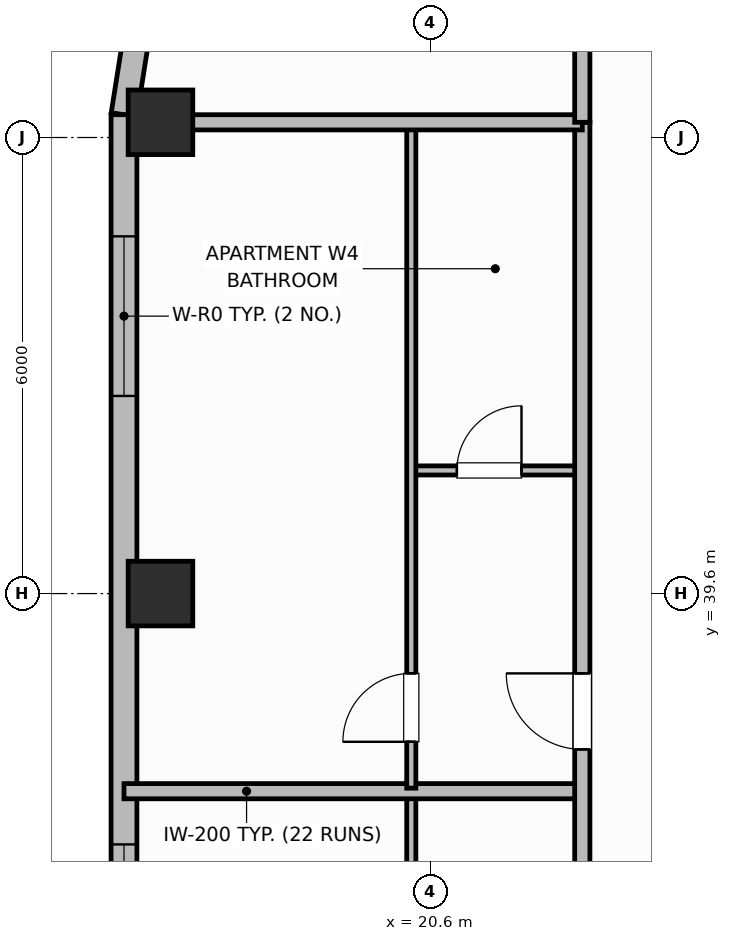
"""IFC4 building model, lengths in metres.
Left out: names, types, materials, properties, quantities, classifications, styles, units other than length and angle.
Written with IfcOpenShell. Run it as: python <this file> out.ifc"""

import sys

from ifc_helpers import new_model, si_unit, direction, frame, frame_2d, origin, origin_2d, place, context, subcontext, project, spatial, rectangle, extrude, element, fill, save


model = new_model("IFC4")
c1 = context("Model", 3, precision=1e-05, world=origin(), true_north=direction((0.0, 1.0)))
c2 = subcontext(c1, "Body", "Model", "MODEL_VIEW")
j1 = project(units=[si_unit("LENGTHUNIT", "METRE"), si_unit("PLANEANGLEUNIT", "RADIAN")], contexts=[c1])
p1 = place(None, origin())
s1 = spatial("IfcSite", under=j1, at=p1, CompositionType="ELEMENT")
p2 = place(p1, origin())
s2 = spatial("IfcBuilding", under=s1, at=p2, CompositionType="ELEMENT")
p3 = place(p2, frame((0.0, 0.0, 222.1)))
s3 = spatial("IfcBuildingStorey", under=s2, at=p3, CompositionType="ELEMENT", Elevation=222.1)
for number, where, z_axis, x_axis in (
    (1, (17.05, 39.6, 0.0), (0.0, 0.0, 1.0), (1.0, 0.0, 0.0)),
    (2, (17.05, 45.8, 0.0), (0.0, 0.0, 1.0), (1.0, 0.0, 0.0)),
):
    element("IfcColumn", number, at=place(p3, frame(where, z_axis=z_axis, x_axis=x_axis)), inside=s3, PredefinedType="COLUMN", context=c2, shape_type="SweptSolid", body=[
        extrude(rectangle(XDim=0.85, YDim=0.85, at=origin_2d()), origin(), (0.0, 0.0, 1.0), 3.7),
    ])
p4 = place(p3, frame((16.748, 47.022, 0.0), z_axis=(0.0, 0.0, 1.0), x_axis=(-0.156481329164, -0.987680916907, 0.0)))
e3 = element("IfcWall", 3, at=p4, inside=s3, PredefinedType="SOLIDWALL", context=c2, shape_type="SweptSolid", body=[
    extrude(rectangle(XDim=1.136, YDim=0.34, at=frame_2d((0.568, 0.0))), origin(), (0.0, 0.0, 1.0), 2.26),
])
p5 = place(p3, frame((16.57, 45.9, 0.0), z_axis=(0.0, 0.0, 1.0), x_axis=(0.0, -1.0, 0.0)))
e4 = element("IfcWall", 4, at=p5, inside=s3, PredefinedType="SOLIDWALL", context=c2, shape_type="SweptSolid", body=[
    extrude(rectangle(XDim=13.3, YDim=0.34, at=frame_2d((6.65, 0.0))), origin(), (0.0, 0.0, 1.0), 2.26),
])
p6 = place(p5, frame((1.6, 0.0, 0.3)))
e5 = element("IfcOpeningElement", 5, at=p6, cuts=e4, PredefinedType="OPENING", context=c2, shape_type="SweptSolid", body=[
    extrude(rectangle(XDim=2.1, YDim=1.9, at=frame_2d((1.05, 0.95))), frame((0.0, 0.18, 0.0), z_axis=(0.0, -1.0, 0.0), x_axis=(1.0, 0.0, 0.0)), (0.0, 0.0, 1.0), 0.36),
])
p7 = place(p5, frame((9.6, 0.0, 0.3)))
e6 = element("IfcOpeningElement", 6, at=p7, cuts=e4, PredefinedType="OPENING", context=c2, shape_type="SweptSolid", body=[
    extrude(rectangle(XDim=2.1, YDim=1.9, at=frame_2d((1.05, 0.95))), frame((0.0, 0.18, 0.0), z_axis=(0.0, -1.0, 0.0), x_axis=(1.0, 0.0, 0.0)), (0.0, 0.0, 1.0), 0.36),
])
p8 = place(p3, frame((20.35, 26.64, 0.0), z_axis=(0.0, 0.0, 1.0), x_axis=(0.0, 1.0, 0.0)))
e7 = element("IfcWall", 7, at=p8, inside=s3, PredefinedType="PARTITIONING", context=c2, shape_type="SweptSolid", body=[
    extrude(rectangle(XDim=10.32, YDim=0.12, at=frame_2d((5.16, 0.0))), origin(), (0.0, 0.0, 1.0), 2.24),
])
p9 = place(p8, frame((2.81, 0.0, 0.0)))
e8 = element("IfcOpeningElement", 8, at=p9, cuts=e7, PredefinedType="OPENING", context=c2, shape_type="SweptSolid", body=[
    extrude(rectangle(XDim=0.9, YDim=2.1, at=frame_2d((0.45, 1.05))), frame((0.0, 0.07, 0.0), z_axis=(0.0, -1.0, 0.0), x_axis=(1.0, 0.0, 0.0)), (0.0, 0.0, 1.0), 0.14),
])
p10 = place(p3, frame((16.57, 37.0, 0.0), z_axis=(0.0, 0.0, 1.0), x_axis=(1.0, 0.0, 0.0)))
e9 = element("IfcWall", 9, at=p10, inside=s3, PredefinedType="PARTITIONING", context=c2, shape_type="SweptSolid", body=[
    extrude(rectangle(XDim=6.03, YDim=0.2, at=frame_2d((3.015, 0.0))), origin(), (0.0, 0.0, 1.0), 2.24),
])
p11 = place(p3, frame((20.35, 41.22, 0.0), z_axis=(0.0, 0.0, 1.0), x_axis=(1.0, 0.0, 0.0)))
e10 = element("IfcWall", 10, at=p11, inside=s3, PredefinedType="PARTITIONING", context=c2, shape_type="SweptSolid", body=[
    extrude(rectangle(XDim=2.25, YDim=0.12, at=frame_2d((1.125, 0.0))), origin(), (0.0, 0.0, 1.0), 2.24),
])
p12 = place(p11, frame((0.6, 0.0, 0.0)))
e11 = element("IfcOpeningElement", 11, at=p12, cuts=e10, PredefinedType="OPENING", context=c2, shape_type="SweptSolid", body=[
    extrude(rectangle(XDim=0.85, YDim=2.1, at=frame_2d((0.425, 1.05))), frame((0.0, 0.07, 0.0), z_axis=(0.0, -1.0, 0.0), x_axis=(1.0, 0.0, 0.0)), (0.0, 0.0, 1.0), 0.14),
])
p13 = place(p3, frame((20.35, 37.04, 0.0), z_axis=(0.0, 0.0, 1.0), x_axis=(0.0, 1.0, 0.0)))
e12 = element("IfcWall", 12, at=p13, inside=s3, PredefinedType="PARTITIONING", context=c2, shape_type="SweptSolid", body=[
    extrude(rectangle(XDim=8.72, YDim=0.12, at=frame_2d((4.36, 0.0))), origin(), (0.0, 0.0, 1.0), 2.24),
])
p14 = place(p13, frame((0.61, 0.0, 0.0)))
e13 = element("IfcOpeningElement", 13, at=p14, cuts=e12, PredefinedType="OPENING", context=c2, shape_type="SweptSolid", body=[
    extrude(rectangle(XDim=0.9, YDim=2.1, at=frame_2d((0.45, 1.05))), frame((0.0, 0.07, 0.0), z_axis=(0.0, -1.0, 0.0), x_axis=(1.0, 0.0, 0.0)), (0.0, 0.0, 1.0), 0.14),
])
p15 = place(p3, frame((22.6, 10.6, 0.0), z_axis=(0.0, 0.0, 1.0), x_axis=(0.0, 1.0, 0.0)))
e14 = element("IfcWall", 14, at=p15, inside=s3, PredefinedType="PARTITIONING", context=c2, shape_type="SweptSolid", body=[
    extrude(rectangle(XDim=35.2, YDim=0.2, at=frame_2d((17.6, 0.0))), origin(), (0.0, 0.0, 1.0), 2.24),
])
p16 = place(p15, frame((2.65, 0.0, 0.0)))
e15 = element("IfcOpeningElement", 15, at=p16, cuts=e14, PredefinedType="OPENING", context=c2, shape_type="SweptSolid", body=[
    extrude(rectangle(XDim=1.0, YDim=2.15, at=frame_2d((0.5, 1.075))), frame((0.0, 0.11, 0.0), z_axis=(0.0, -1.0, 0.0), x_axis=(1.0, 0.0, 0.0)), (0.0, 0.0, 1.0), 0.22),
])
p17 = place(p15, frame((10.81, 0.0, 0.0)))
e16 = element("IfcOpeningElement", 16, at=p17, cuts=e14, PredefinedType="OPENING", context=c2, shape_type="SweptSolid", body=[
    extrude(rectangle(XDim=1.0, YDim=2.15, at=frame_2d((0.5, 1.075))), frame((0.0, 0.11, 0.0), z_axis=(0.0, -1.0, 0.0), x_axis=(1.0, 0.0, 0.0)), (0.0, 0.0, 1.0), 0.22),
])
p18 = place(p15, frame((19.54, 0.0, 0.0)))
e17 = element("IfcOpeningElement", 17, at=p18, cuts=e14, PredefinedType="OPENING", context=c2, shape_type="SweptSolid", body=[
    extrude(rectangle(XDim=1.0, YDim=2.15, at=frame_2d((0.5, 1.075))), frame((0.0, 0.11, 0.0), z_axis=(0.0, -1.0, 0.0), x_axis=(1.0, 0.0, 0.0)), (0.0, 0.0, 1.0), 0.22),
])
p19 = place(p15, frame((26.95, 0.0, 0.0)))
e18 = element("IfcOpeningElement", 18, at=p19, cuts=e14, PredefinedType="OPENING", context=c2, shape_type="SweptSolid", body=[
    extrude(rectangle(XDim=1.0, YDim=2.15, at=frame_2d((0.5, 1.075))), frame((0.0, 0.11, 0.0), z_axis=(0.0, -1.0, 0.0), x_axis=(1.0, 0.0, 0.0)), (0.0, 0.0, 1.0), 0.22),
])
p20 = place(p3, frame((16.99, 45.8, 0.0), z_axis=(0.0, 0.0, 1.0), x_axis=(1.0, 0.0, 0.0)))
e19 = element("IfcWall", 19, at=p20, inside=s3, PredefinedType="PARTITIONING", context=c2, shape_type="SweptSolid", body=[
    extrude(rectangle(XDim=5.61, YDim=0.2, at=frame_2d((2.805, 0.0))), origin(), (0.0, 0.0, 1.0), 2.24),
])
p21 = place(p3, frame((22.6, 45.8, 0.0), z_axis=(0.0, 0.0, 1.0), x_axis=(0.0, 1.0, 0.0)))
e20 = element("IfcWall", 20, at=p21, inside=s3, PredefinedType="PARTITIONING", context=c2, shape_type="SweptSolid", body=[
    extrude(rectangle(XDim=3.73, YDim=0.2, at=frame_2d((1.865, 0.0))), origin(), (0.0, 0.0, 1.0), 2.24),
])
p22 = place(p6, origin())
e21 = element("IfcWindow", 21, at=p22, inside=s3, PartitioningType="SINGLE_PANEL", PredefinedType="WINDOW", context=c2, shape_type="SweptSolid", body=[
    extrude(rectangle(XDim=2.1, YDim=1.9, at=frame_2d((1.05, 0.95))), frame((0.0, 0.03, 0.0), z_axis=(0.0, -1.0, 0.0), x_axis=(1.0, 0.0, 0.0)), (0.0, 0.0, 1.0), 0.06),
])
fill(e5, e21)
p23 = place(p7, origin())
e22 = element("IfcWindow", 22, at=p23, inside=s3, PartitioningType="SINGLE_PANEL", PredefinedType="WINDOW", context=c2, shape_type="SweptSolid", body=[
    extrude(rectangle(XDim=2.1, YDim=1.9, at=frame_2d((1.05, 0.95))), frame((0.0, 0.03, 0.0), z_axis=(0.0, -1.0, 0.0), x_axis=(1.0, 0.0, 0.0)), (0.0, 0.0, 1.0), 0.06),
])
fill(e6, e22)
p24 = place(p12, origin())
e23 = element("IfcDoor", 23, at=p24, inside=s3, OperationType="SINGLE_SWING_RIGHT", PredefinedType="DOOR", context=c2, shape_type="SweptSolid", body=[
    extrude(rectangle(XDim=0.85, YDim=2.1, at=frame_2d((0.425, 1.05))), frame((0.0, 0.025, 0.0), z_axis=(0.0, -1.0, 0.0), x_axis=(1.0, 0.0, 0.0)), (0.0, 0.0, 1.0), 0.05),
])
fill(e11, e23)
p25 = place(p14, origin())
e24 = element("IfcDoor", 24, at=p25, inside=s3, OperationType="SINGLE_SWING_LEFT", PredefinedType="DOOR", context=c2, shape_type="SweptSolid", body=[
    extrude(rectangle(XDim=0.9, YDim=2.1, at=frame_2d((0.45, 1.05))), frame((0.0, 0.025, 0.0), z_axis=(0.0, -1.0, 0.0), x_axis=(1.0, 0.0, 0.0)), (0.0, 0.0, 1.0), 0.05),
])
fill(e13, e24)
p26 = place(p19, origin())
e25 = element("IfcDoor", 25, at=p26, inside=s3, OperationType="SINGLE_SWING_RIGHT", PredefinedType="DOOR", context=c2, shape_type="SweptSolid", body=[
    extrude(rectangle(XDim=1.0, YDim=2.15, at=frame_2d((0.5, 1.075))), frame((0.0, 0.025, 0.0), z_axis=(0.0, -1.0, 0.0), x_axis=(1.0, 0.0, 0.0)), (0.0, 0.0, 1.0), 0.05),
])
fill(e18, e25)
save(model, sys.argv[1])
